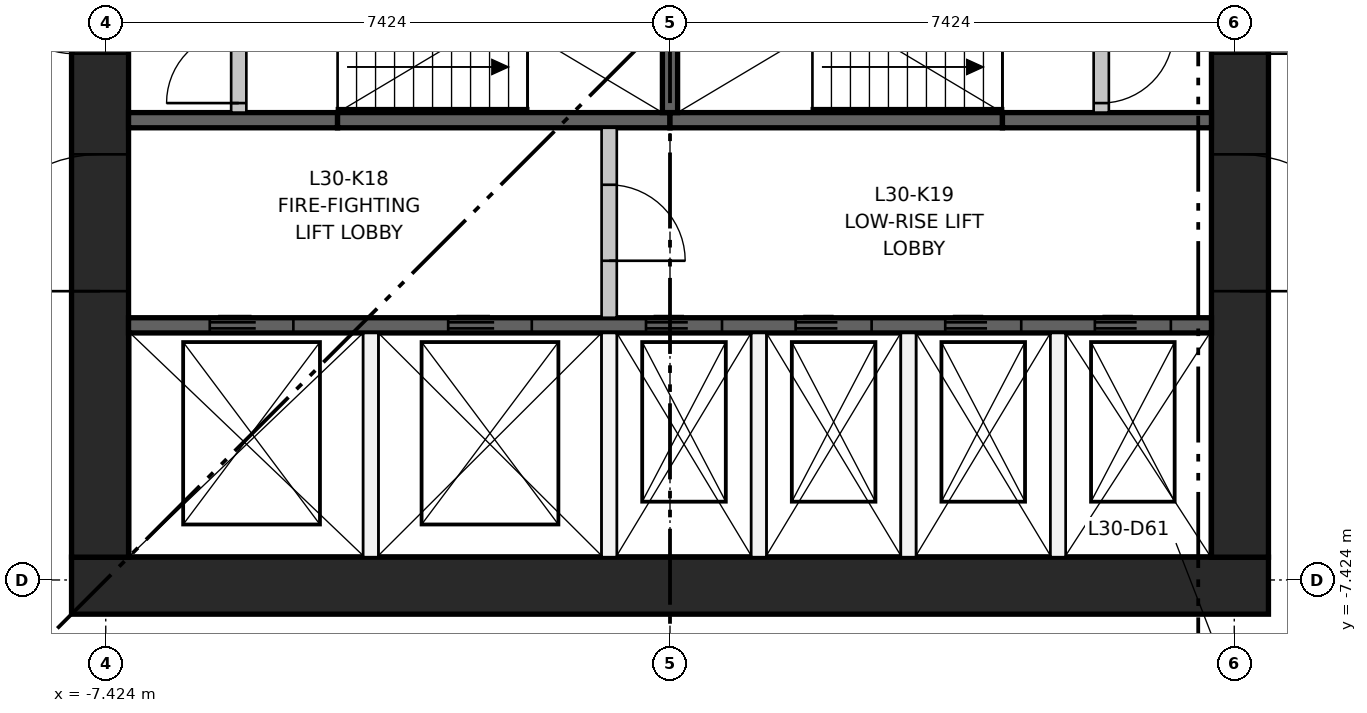
"""IFC4 building model, lengths in metres.
Left out: names, types, materials, properties, quantities, classifications, styles, units other than length and angle.
Written with IfcOpenShell. Run it as: python <this file> out.ifc"""

import sys

from ifc_helpers import new_model, si_unit, direction, frame, frame_2d, origin, place, context, subcontext, project, spatial, rectangle, extrude, element, fill, save


model = new_model("IFC4")
c1 = context("Model", 3, precision=1e-05, world=origin(), true_north=direction((0.0, 1.0)))
c2 = subcontext(c1, "Body", "Model", "MODEL_VIEW")
j1 = project(units=[si_unit("LENGTHUNIT", "METRE"), si_unit("PLANEANGLEUNIT", "RADIAN")], contexts=[c1])
p1 = place(None, origin())
s1 = spatial("IfcSite", under=j1, at=p1, CompositionType="ELEMENT")
p2 = place(p1, origin())
s2 = spatial("IfcBuilding", under=s1, at=p2, CompositionType="ELEMENT")
p3 = place(p2, frame((0.0, 0.0, 116.55)))
s3 = spatial("IfcBuildingStorey", under=s2, at=p3, CompositionType="ELEMENT", Elevation=116.55)
p4 = place(p3, frame((-7.874, -7.499, 0.0), z_axis=(0.0, 0.0, 1.0), x_axis=(1.0, 0.0, 0.0)))
e1 = element("IfcWall", 1, at=p4, inside=s3, PredefinedType="SHEAR", context=c2, shape_type="SweptSolid", body=[
    extrude(rectangle(XDim=15.748, YDim=0.75, at=frame_2d((7.874, 0.0))), origin(), (0.0, 0.0, 1.0), 4.4),
])
p5 = place(p3, frame((-7.499, -7.124, 0.0), z_axis=(0.0, 0.0, 1.0), x_axis=(0.0, 1.0, 0.0)))
e2 = element("IfcWall", 2, at=p5, inside=s3, PredefinedType="SHEAR", context=c2, shape_type="SweptSolid", body=[
    extrude(rectangle(XDim=14.248, YDim=0.75, at=frame_2d((7.124, 0.0))), origin(), (0.0, 0.0, 1.0), 4.4),
])
p6 = place(p5, frame((6.624, 0.0, 0.0)))
e3 = element("IfcOpeningElement", 3, at=p6, cuts=e2, PredefinedType="OPENING", context=c2, shape_type="SweptSolid", body=[
    extrude(rectangle(XDim=1.0, YDim=2.1, at=frame_2d((0.5, 1.05))), frame((0.0, 0.385, 0.0), z_axis=(0.0, -1.0, 0.0), x_axis=(1.0, 0.0, 0.0)), (0.0, 0.0, 1.0), 0.77),
])
p7 = place(p5, frame((3.5, 0.0, 0.0)))
e4 = element("IfcOpeningElement", 4, at=p7, cuts=e2, PredefinedType="OPENING", context=c2, shape_type="SweptSolid", body=[
    extrude(rectangle(XDim=1.8, YDim=2.1, at=frame_2d((0.9, 1.05))), frame((0.0, 0.385, 0.0), z_axis=(0.0, -1.0, 0.0), x_axis=(1.0, 0.0, 0.0)), (0.0, 0.0, 1.0), 0.77),
])
p8 = place(p5, frame((8.948, 0.0, 0.0)))
e5 = element("IfcOpeningElement", 5, at=p8, cuts=e2, PredefinedType="OPENING", context=c2, shape_type="SweptSolid", body=[
    extrude(rectangle(XDim=1.8, YDim=2.1, at=frame_2d((0.9, 1.05))), frame((0.0, 0.385, 0.0), z_axis=(0.0, -1.0, 0.0), x_axis=(1.0, 0.0, 0.0)), (0.0, 0.0, 1.0), 0.77),
])
p9 = place(p3, frame((7.499, -7.124, 0.0), z_axis=(0.0, 0.0, 1.0), x_axis=(0.0, 1.0, 0.0)))
e6 = element("IfcWall", 6, at=p9, inside=s3, PredefinedType="SHEAR", context=c2, shape_type="SweptSolid", body=[
    extrude(rectangle(XDim=14.248, YDim=0.75, at=frame_2d((7.124, 0.0))), origin(), (0.0, 0.0, 1.0), 4.4),
])
p10 = place(p9, frame((6.624, 0.0, 0.0)))
e7 = element("IfcOpeningElement", 7, at=p10, cuts=e6, PredefinedType="OPENING", context=c2, shape_type="SweptSolid", body=[
    extrude(rectangle(XDim=1.0, YDim=2.1, at=frame_2d((0.5, 1.05))), frame((0.0, 0.385, 0.0), z_axis=(0.0, -1.0, 0.0), x_axis=(1.0, 0.0, 0.0)), (0.0, 0.0, 1.0), 0.77),
])
p11 = place(p9, frame((3.5, 0.0, 0.0)))
e8 = element("IfcOpeningElement", 8, at=p11, cuts=e6, PredefinedType="OPENING", context=c2, shape_type="SweptSolid", body=[
    extrude(rectangle(XDim=1.8, YDim=2.1, at=frame_2d((0.9, 1.05))), frame((0.0, 0.385, 0.0), z_axis=(0.0, -1.0, 0.0), x_axis=(1.0, 0.0, 0.0)), (0.0, 0.0, 1.0), 0.77),
])
p12 = place(p9, frame((8.948, 0.0, 0.0)))
e9 = element("IfcOpeningElement", 9, at=p12, cuts=e6, PredefinedType="OPENING", context=c2, shape_type="SweptSolid", body=[
    extrude(rectangle(XDim=1.8, YDim=2.1, at=frame_2d((0.9, 1.05))), frame((0.0, 0.385, 0.0), z_axis=(0.0, -1.0, 0.0), x_axis=(1.0, 0.0, 0.0)), (0.0, 0.0, 1.0), 0.77),
])
p13 = place(p3, frame((-7.124, -4.074, 0.0), z_axis=(0.0, 0.0, 1.0), x_axis=(1.0, 0.0, 0.0)))
e10 = element("IfcWall", 10, at=p13, inside=s3, PredefinedType="SHEAR", context=c2, shape_type="SweptSolid", body=[
    extrude(rectangle(XDim=14.248, YDim=0.2, at=frame_2d((7.124, 0.0))), origin(), (0.0, 0.0, 1.0), 4.05),
])
p14 = place(p13, frame((1.069, 0.0, 0.0)))
e11 = element("IfcOpeningElement", 11, at=p14, cuts=e10, PredefinedType="OPENING", context=c2, shape_type="SweptSolid", body=[
    extrude(rectangle(XDim=1.1, YDim=2.1, at=frame_2d((0.55, 1.05))), frame((0.0, 0.11, 0.0), z_axis=(0.0, -1.0, 0.0), x_axis=(1.0, 0.0, 0.0)), (0.0, 0.0, 1.0), 0.22),
])
p15 = place(p13, frame((4.206, 0.0, 0.0)))
e12 = element("IfcOpeningElement", 12, at=p15, cuts=e10, PredefinedType="OPENING", context=c2, shape_type="SweptSolid", body=[
    extrude(rectangle(XDim=1.1, YDim=2.1, at=frame_2d((0.55, 1.05))), frame((0.0, 0.11, 0.0), z_axis=(0.0, -1.0, 0.0), x_axis=(1.0, 0.0, 0.0)), (0.0, 0.0, 1.0), 0.22),
])
p16 = place(p13, frame((6.808, 0.0, 0.0)))
e13 = element("IfcOpeningElement", 13, at=p16, cuts=e10, PredefinedType="OPENING", context=c2, shape_type="SweptSolid", body=[
    extrude(rectangle(XDim=1.0, YDim=2.1, at=frame_2d((0.5, 1.05))), frame((0.0, 0.11, 0.0), z_axis=(0.0, -1.0, 0.0), x_axis=(1.0, 0.0, 0.0)), (0.0, 0.0, 1.0), 0.22),
])
p17 = place(p13, frame((8.777, 0.0, 0.0)))
e14 = element("IfcOpeningElement", 14, at=p17, cuts=e10, PredefinedType="OPENING", context=c2, shape_type="SweptSolid", body=[
    extrude(rectangle(XDim=1.0, YDim=2.1, at=frame_2d((0.5, 1.05))), frame((0.0, 0.11, 0.0), z_axis=(0.0, -1.0, 0.0), x_axis=(1.0, 0.0, 0.0)), (0.0, 0.0, 1.0), 0.22),
])
p18 = place(p13, frame((10.745, 0.0, 0.0)))
e15 = element("IfcOpeningElement", 15, at=p18, cuts=e10, PredefinedType="OPENING", context=c2, shape_type="SweptSolid", body=[
    extrude(rectangle(XDim=1.0, YDim=2.1, at=frame_2d((0.5, 1.05))), frame((0.0, 0.11, 0.0), z_axis=(0.0, -1.0, 0.0), x_axis=(1.0, 0.0, 0.0)), (0.0, 0.0, 1.0), 0.22),
])
p19 = place(p13, frame((12.714, 0.0, 0.0)))
e16 = element("IfcOpeningElement", 16, at=p19, cuts=e10, PredefinedType="OPENING", context=c2, shape_type="SweptSolid", body=[
    extrude(rectangle(XDim=1.0, YDim=2.1, at=frame_2d((0.5, 1.05))), frame((0.0, 0.11, 0.0), z_axis=(0.0, -1.0, 0.0), x_axis=(1.0, 0.0, 0.0)), (0.0, 0.0, 1.0), 0.22),
])
p20 = place(p3, frame((-7.124, -1.375, 0.0), z_axis=(0.0, 0.0, 1.0), x_axis=(1.0, 0.0, 0.0)))
e17 = element("IfcWall", 17, at=p20, inside=s3, PredefinedType="SHEAR", context=c2, shape_type="SweptSolid", body=[
    extrude(rectangle(XDim=2.75, YDim=0.2, at=frame_2d((1.375, 0.0))), origin(), (0.0, 0.0, 1.0), 4.05),
])
for number, where, z_axis, x_axis in (
    (18, (-4.374, -1.375, 0.0), (0.0, 0.0, 1.0), (1.0, 0.0, 0.0)),
    (19, (0.0, -1.375, 0.0), (0.0, 0.0, 1.0), (1.0, 0.0, 0.0)),
):
    element("IfcWall", number, at=place(p3, frame(where, z_axis=z_axis, x_axis=x_axis)), inside=s3, PredefinedType="SHEAR", context=c2, shape_type="SweptSolid", body=[
        extrude(rectangle(XDim=4.374, YDim=0.2, at=frame_2d((2.187, 0.0))), origin(), (0.0, 0.0, 1.0), 4.05),
    ])
p21 = place(p3, frame((4.374, -1.375, 0.0), z_axis=(0.0, 0.0, 1.0), x_axis=(1.0, 0.0, 0.0)))
e20 = element("IfcWall", 20, at=p21, inside=s3, PredefinedType="SHEAR", context=c2, shape_type="SweptSolid", body=[
    extrude(rectangle(XDim=2.75, YDim=0.2, at=frame_2d((1.375, 0.0))), origin(), (0.0, 0.0, 1.0), 4.05),
])
p22 = place(p3, frame((0.0, -1.275, 0.0), z_axis=(0.0, 0.0, 1.0), x_axis=(0.0, 1.0, 0.0)))
e21 = element("IfcWall", 21, at=p22, inside=s3, PredefinedType="SHEAR", context=c2, shape_type="SweptSolid", body=[
    extrude(rectangle(XDim=2.55, YDim=0.2, at=frame_2d((1.275, 0.0))), origin(), (0.0, 0.0, 1.0), 4.05),
])
for number, where, z_axis, x_axis in (
    (22, (-3.937, -7.124, 0.0), (0.0, 0.0, 1.0), (0.0, 1.0, 0.0)),
    (23, (-0.8, -7.124, 0.0), (0.0, 0.0, 1.0), (0.0, 1.0, 0.0)),
):
    element("IfcWall", number, at=place(p3, frame(where, z_axis=z_axis, x_axis=x_axis)), inside=s3, PredefinedType="PARTITIONING", context=c2, shape_type="SweptSolid", body=[
        extrude(rectangle(XDim=2.95, YDim=0.2, at=frame_2d((1.475, 0.0))), origin(), (0.0, 0.0, 1.0), 4.05),
    ])
p23 = place(p3, frame((-0.8, -3.974, 0.0), z_axis=(0.0, 0.0, 1.0), x_axis=(0.0, 1.0, 0.0)))
e24 = element("IfcWall", 24, at=p23, inside=s3, PredefinedType="PARTITIONING", context=c2, shape_type="SweptSolid", body=[
    extrude(rectangle(XDim=2.499, YDim=0.2, at=frame_2d((1.25, 0.0))), origin(), (0.0, 0.0, 1.0), 4.05),
])
p24 = place(p23, frame((0.75, 0.0, 0.0)))
e25 = element("IfcOpeningElement", 25, at=p24, cuts=e24, PredefinedType="OPENING", context=c2, shape_type="SweptSolid", body=[
    extrude(rectangle(XDim=1.0, YDim=2.1, at=frame_2d((0.5, 1.05))), frame((0.0, 0.11, 0.0), z_axis=(0.0, -1.0, 0.0), x_axis=(1.0, 0.0, 0.0)), (0.0, 0.0, 1.0), 0.22),
])
for number, where, z_axis, x_axis in (
    (26, (1.168, -7.124, 0.0), (0.0, 0.0, 1.0), (0.0, 1.0, 0.0)),
    (27, (3.137, -7.124, 0.0), (0.0, 0.0, 1.0), (0.0, 1.0, 0.0)),
    (28, (5.105, -7.124, 0.0), (0.0, 0.0, 1.0), (0.0, 1.0, 0.0)),
):
    element("IfcWall", number, at=place(p3, frame(where, z_axis=z_axis, x_axis=x_axis)), inside=s3, PredefinedType="PARTITIONING", context=c2, shape_type="SweptSolid", body=[
        extrude(rectangle(XDim=2.95, YDim=0.2, at=frame_2d((1.475, 0.0))), origin(), (0.0, 0.0, 1.0), 4.05),
    ])
p25 = place(p3, frame((-5.674, -1.275, 0.0), z_axis=(0.0, 0.0, 1.0), x_axis=(0.0, 1.0, 0.0)))
e29 = element("IfcWall", 29, at=p25, inside=s3, PredefinedType="PARTITIONING", context=c2, shape_type="SweptSolid", body=[
    extrude(rectangle(XDim=2.55, YDim=0.2, at=frame_2d((1.275, 0.0))), origin(), (0.0, 0.0, 1.0), 4.05),
])
p26 = place(p25, frame((0.125, 0.0, 0.0)))
e30 = element("IfcOpeningElement", 30, at=p26, cuts=e29, PredefinedType="OPENING", context=c2, shape_type="SweptSolid", body=[
    extrude(rectangle(XDim=0.95, YDim=2.1, at=frame_2d((0.475, 1.05))), frame((0.0, 0.11, 0.0), z_axis=(0.0, -1.0, 0.0), x_axis=(1.0, 0.0, 0.0)), (0.0, 0.0, 1.0), 0.22),
])
p27 = place(p25, frame((1.475, 0.0, 0.0)))
e31 = element("IfcOpeningElement", 31, at=p27, cuts=e29, PredefinedType="OPENING", context=c2, shape_type="SweptSolid", body=[
    extrude(rectangle(XDim=0.95, YDim=2.1, at=frame_2d((0.475, 1.05))), frame((0.0, 0.11, 0.0), z_axis=(0.0, -1.0, 0.0), x_axis=(1.0, 0.0, 0.0)), (0.0, 0.0, 1.0), 0.22),
])
p28 = place(p3, frame((5.674, -1.275, 0.0), z_axis=(0.0, 0.0, 1.0), x_axis=(0.0, 1.0, 0.0)))
e32 = element("IfcWall", 32, at=p28, inside=s3, PredefinedType="PARTITIONING", context=c2, shape_type="SweptSolid", body=[
    extrude(rectangle(XDim=2.55, YDim=0.2, at=frame_2d((1.275, 0.0))), origin(), (0.0, 0.0, 1.0), 4.05),
])
p29 = place(p28, frame((0.125, 0.0, 0.0)))
e33 = element("IfcOpeningElement", 33, at=p29, cuts=e32, PredefinedType="OPENING", context=c2, shape_type="SweptSolid", body=[
    extrude(rectangle(XDim=0.95, YDim=2.1, at=frame_2d((0.475, 1.05))), frame((0.0, 0.11, 0.0), z_axis=(0.0, -1.0, 0.0), x_axis=(1.0, 0.0, 0.0)), (0.0, 0.0, 1.0), 0.22),
])
p30 = place(p28, frame((1.475, 0.0, 0.0)))
e34 = element("IfcOpeningElement", 34, at=p30, cuts=e32, PredefinedType="OPENING", context=c2, shape_type="SweptSolid", body=[
    extrude(rectangle(XDim=0.95, YDim=2.1, at=frame_2d((0.475, 1.05))), frame((0.0, 0.11, 0.0), z_axis=(0.0, -1.0, 0.0), x_axis=(1.0, 0.0, 0.0)), (0.0, 0.0, 1.0), 0.22),
])
p31 = place(p14, origin())
e35 = element("IfcDoor", 35, at=p31, inside=s3, OperationType="DOUBLE_DOOR_SLIDING", PredefinedType="DOOR", context=c2, shape_type="SweptSolid", body=[
    extrude(rectangle(XDim=1.1, YDim=2.1, at=frame_2d((0.55, 1.05))), frame((0.0, 0.025, 0.0), z_axis=(0.0, -1.0, 0.0), x_axis=(1.0, 0.0, 0.0)), (0.0, 0.0, 1.0), 0.05),
])
fill(e11, e35)
p32 = place(p15, origin())
e36 = element("IfcDoor", 36, at=p32, inside=s3, OperationType="DOUBLE_DOOR_SLIDING", PredefinedType="DOOR", context=c2, shape_type="SweptSolid", body=[
    extrude(rectangle(XDim=1.1, YDim=2.1, at=frame_2d((0.55, 1.05))), frame((0.0, 0.025, 0.0), z_axis=(0.0, -1.0, 0.0), x_axis=(1.0, 0.0, 0.0)), (0.0, 0.0, 1.0), 0.05),
])
fill(e12, e36)
p33 = place(p16, origin())
e37 = element("IfcDoor", 37, at=p33, inside=s3, OperationType="DOUBLE_DOOR_SLIDING", PredefinedType="DOOR", context=c2, shape_type="SweptSolid", body=[
    extrude(rectangle(XDim=1.0, YDim=2.1, at=frame_2d((0.5, 1.05))), frame((0.0, 0.025, 0.0), z_axis=(0.0, -1.0, 0.0), x_axis=(1.0, 0.0, 0.0)), (0.0, 0.0, 1.0), 0.05),
])
fill(e13, e37)
p34 = place(p17, origin())
e38 = element("IfcDoor", 38, at=p34, inside=s3, OperationType="DOUBLE_DOOR_SLIDING", PredefinedType="DOOR", context=c2, shape_type="SweptSolid", body=[
    extrude(rectangle(XDim=1.0, YDim=2.1, at=frame_2d((0.5, 1.05))), frame((0.0, 0.025, 0.0), z_axis=(0.0, -1.0, 0.0), x_axis=(1.0, 0.0, 0.0)), (0.0, 0.0, 1.0), 0.05),
])
fill(e14, e38)
p35 = place(p18, origin())
e39 = element("IfcDoor", 39, at=p35, inside=s3, OperationType="DOUBLE_DOOR_SLIDING", PredefinedType="DOOR", context=c2, shape_type="SweptSolid", body=[
    extrude(rectangle(XDim=1.0, YDim=2.1, at=frame_2d((0.5, 1.05))), frame((0.0, 0.025, 0.0), z_axis=(0.0, -1.0, 0.0), x_axis=(1.0, 0.0, 0.0)), (0.0, 0.0, 1.0), 0.05),
])
fill(e15, e39)
p36 = place(p19, origin())
e40 = element("IfcDoor", 40, at=p36, inside=s3, OperationType="DOUBLE_DOOR_SLIDING", PredefinedType="DOOR", context=c2, shape_type="SweptSolid", body=[
    extrude(rectangle(XDim=1.0, YDim=2.1, at=frame_2d((0.5, 1.05))), frame((0.0, 0.025, 0.0), z_axis=(0.0, -1.0, 0.0), x_axis=(1.0, 0.0, 0.0)), (0.0, 0.0, 1.0), 0.05),
])
fill(e16, e40)
p37 = place(p26, origin())
e41 = element("IfcDoor", 41, at=p37, inside=s3, OperationType="SINGLE_SWING_LEFT", PredefinedType="DOOR", context=c2, shape_type="SweptSolid", body=[
    extrude(rectangle(XDim=0.95, YDim=2.1, at=frame_2d((0.475, 1.05))), frame((0.0, 0.025, 0.0), z_axis=(0.0, -1.0, 0.0), x_axis=(1.0, 0.0, 0.0)), (0.0, 0.0, 1.0), 0.05),
])
fill(e30, e41)
p38 = place(p29, frame((0.95, 0.0, 0.0), z_axis=(0.0, 0.0, 1.0), x_axis=(-1.0, 0.0, 0.0)))
e42 = element("IfcDoor", 42, at=p38, inside=s3, OperationType="SINGLE_SWING_RIGHT", PredefinedType="DOOR", context=c2, shape_type="SweptSolid", body=[
    extrude(rectangle(XDim=0.95, YDim=2.1, at=frame_2d((0.475, 1.05))), frame((0.0, 0.025, 0.0), z_axis=(0.0, -1.0, 0.0), x_axis=(1.0, 0.0, 0.0)), (0.0, 0.0, 1.0), 0.05),
])
fill(e33, e42)
p39 = place(p24, frame((1.0, 0.0, 0.0), z_axis=(0.0, 0.0, 1.0), x_axis=(-1.0, 0.0, 0.0)))
e43 = element("IfcDoor", 43, at=p39, inside=s3, OperationType="SINGLE_SWING_LEFT", PredefinedType="DOOR", context=c2, shape_type="SweptSolid", body=[
    extrude(rectangle(XDim=1.0, YDim=2.1, at=frame_2d((0.5, 1.05))), frame((0.0, 0.025, 0.0), z_axis=(0.0, -1.0, 0.0), x_axis=(1.0, 0.0, 0.0)), (0.0, 0.0, 1.0), 0.05),
])
fill(e25, e43)
p40 = place(p6, origin())
e44 = element("IfcDoor", 44, at=p40, inside=s3, OperationType="SINGLE_SWING_RIGHT", PredefinedType="DOOR", context=c2, shape_type="SweptSolid", body=[
    extrude(rectangle(XDim=1.0, YDim=2.1, at=frame_2d((0.5, 1.05))), frame((0.0, 0.375, 0.0), z_axis=(0.0, -1.0, 0.0), x_axis=(1.0, 0.0, 0.0)), (0.0, 0.0, 1.0), 0.05),
])
fill(e3, e44)
p41 = place(p7, origin())
e45 = element("IfcDoor", 45, at=p41, inside=s3, OperationType="DOUBLE_DOOR_SINGLE_SWING", PredefinedType="DOOR", context=c2, shape_type="SweptSolid", body=[
    extrude(rectangle(XDim=1.8, YDim=2.1, at=frame_2d((0.9, 1.05))), frame((0.0, 0.025, 0.0), z_axis=(0.0, -1.0, 0.0), x_axis=(1.0, 0.0, 0.0)), (0.0, 0.0, 1.0), 0.05),
])
fill(e4, e45)
p42 = place(p10, frame((1.0, 0.0, 0.0), z_axis=(0.0, 0.0, 1.0), x_axis=(-1.0, 0.0, 0.0)))
e46 = element("IfcDoor", 46, at=p42, inside=s3, OperationType="SINGLE_SWING_LEFT", PredefinedType="DOOR", context=c2, shape_type="SweptSolid", body=[
    extrude(rectangle(XDim=1.0, YDim=2.1, at=frame_2d((0.5, 1.05))), frame((0.0, 0.375, 0.0), z_axis=(0.0, -1.0, 0.0), x_axis=(1.0, 0.0, 0.0)), (0.0, 0.0, 1.0), 0.05),
])
fill(e7, e46)
p43 = place(p11, frame((1.8, 0.0, 0.0), z_axis=(0.0, 0.0, 1.0), x_axis=(-1.0, 0.0, 0.0)))
e47 = element("IfcDoor", 47, at=p43, inside=s3, OperationType="DOUBLE_DOOR_SINGLE_SWING", PredefinedType="DOOR", context=c2, shape_type="SweptSolid", body=[
    extrude(rectangle(XDim=1.8, YDim=2.1, at=frame_2d((0.9, 1.05))), frame((0.0, 0.025, 0.0), z_axis=(0.0, -1.0, 0.0), x_axis=(1.0, 0.0, 0.0)), (0.0, 0.0, 1.0), 0.05),
])
fill(e8, e47)
save(model, sys.argv[1])
